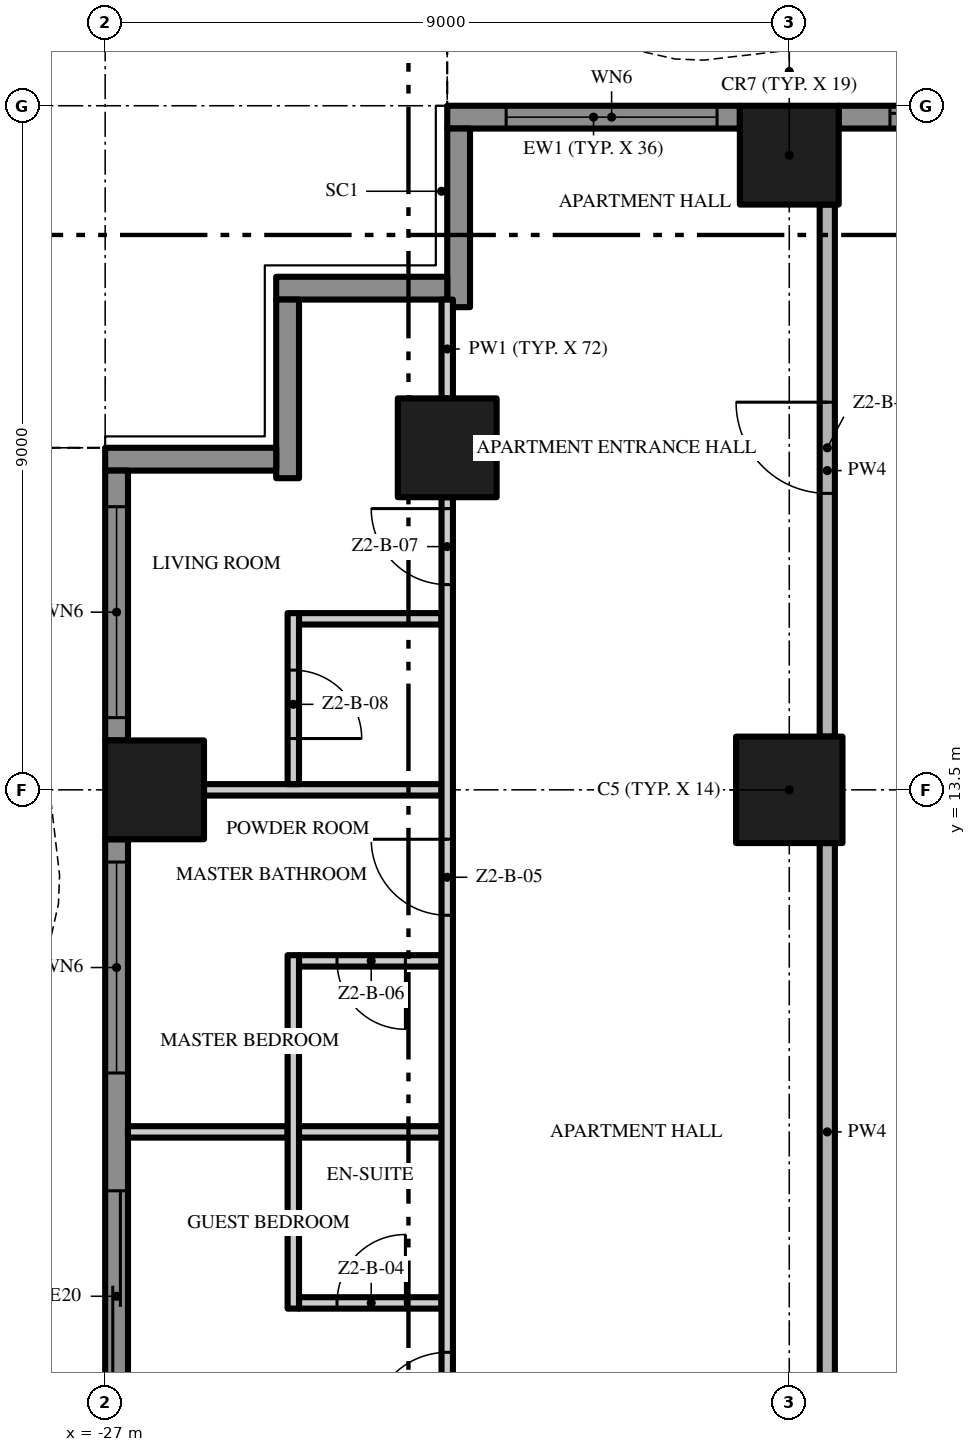
"""IFC4 building model, lengths in metres.
Left out: names, types, materials, properties, quantities, classifications, styles, units other than length and angle.
Written with IfcOpenShell. Run it as: python <this file> out.ifc"""

import sys

from ifc_helpers import new_model, si_unit, direction, frame, frame_2d, origin, origin_2d, place, context, subcontext, project, spatial, polyline, rectangle, outline, extrude, element, fill, save


model = new_model("IFC4")
c1 = context("Model", 3, precision=1e-05, world=origin(), true_north=direction((0.0, 1.0)))
c2 = subcontext(c1, "Body", "Model", "MODEL_VIEW")
j1 = project(units=[si_unit("LENGTHUNIT", "METRE"), si_unit("PLANEANGLEUNIT", "RADIAN")], contexts=[c1])
p1 = place(None, origin())
s1 = spatial("IfcSite", under=j1, at=p1, CompositionType="ELEMENT")
p2 = place(p1, origin())
s2 = spatial("IfcBuilding", under=s1, at=p2, CompositionType="ELEMENT")
p3 = place(p2, frame((0.0, 0.0, 88.4)))
s3 = spatial("IfcBuildingStorey", under=s2, at=p3, CompositionType="ELEMENT", Elevation=88.4)
p4 = place(p3, frame((-18.0, 13.5, 0.0), z_axis=(0.0, 0.0, 1.0), x_axis=(1.0, 0.0, 0.0)))
e1 = element("IfcColumn", 1, at=p4, inside=s3, PredefinedType="COLUMN", context=c2, shape_type="SweptSolid", body=[
    extrude(rectangle(XDim=1.4, YDim=1.4, at=origin_2d()), origin(), (0.0, 0.0, 1.0), 3.5),
])
for number, where, z_axis, x_axis in (
    (2, (-18.0, 21.85, 0.0), (0.0, 0.0, 1.0), (1.0, 0.0, 0.0)),
    (3, (-26.35, 13.5, 0.0), (0.0, 0.0, 1.0), (1.0, 0.0, 0.0)),
    (4, (-22.5, 18.0, 0.0), (0.0, 0.0, 1.0), (1.0, 0.0, 0.0)),
):
    element("IfcColumn", number, at=place(p3, frame(where, z_axis=z_axis, x_axis=x_axis)), inside=s3, PredefinedType="COLUMN", context=c2, shape_type="SweptSolid", body=[
        extrude(rectangle(XDim=1.3, YDim=1.3, at=origin_2d()), origin(), (0.0, 0.0, 1.0), 3.5),
    ])
p5 = place(p3, frame((-17.35, 22.35, 0.0), z_axis=(0.0, 0.0, 1.0), x_axis=(1.0, 0.0, 0.0)))
e5 = element("IfcWall", 5, at=p5, inside=s3, PredefinedType="SOLIDWALL", context=c2, shape_type="SweptSolid", body=[
    extrude(rectangle(XDim=3.85, YDim=0.3, at=frame_2d((1.925, 0.0))), origin(), (0.0, 0.0, 1.0), 3.5),
])
p6 = place(p5, frame((0.675, 0.0, 0.0)))
e6 = element("IfcOpeningElement", 6, at=p6, cuts=e5, PredefinedType="OPENING", context=c2, shape_type="SweptSolid", body=[
    extrude(rectangle(XDim=2.4, YDim=2.4, at=frame_2d((1.2, 1.2))), frame((0.0, 0.16, 0.0), z_axis=(0.0, -1.0, 0.0), x_axis=(1.0, 0.0, 0.0)), (0.0, 0.0, 1.0), 0.32),
])
p7 = place(p3, frame((-22.5, 22.35, 0.0), z_axis=(0.0, 0.0, 1.0), x_axis=(1.0, 0.0, 0.0)))
e7 = element("IfcWall", 7, at=p7, inside=s3, PredefinedType="SOLIDWALL", context=c2, shape_type="SweptSolid", body=[
    extrude(rectangle(XDim=3.85, YDim=0.3, at=frame_2d((1.925, 0.0))), origin(), (0.0, 0.0, 1.0), 3.5),
])
p8 = place(p7, frame((0.775, 0.0, 0.45)))
e8 = element("IfcOpeningElement", 8, at=p8, cuts=e7, PredefinedType="OPENING", context=c2, shape_type="SweptSolid", body=[
    extrude(rectangle(XDim=2.775, YDim=2.65, at=frame_2d((1.387, 1.325))), frame((0.0, 0.16, 0.0), z_axis=(0.0, -1.0, 0.0), x_axis=(1.0, 0.0, 0.0)), (0.0, 0.0, 1.0), 0.32),
])
p9 = place(p3, frame((-22.35, 19.85, 0.0), z_axis=(0.0, 0.0, 1.0), x_axis=(0.0, 1.0, 0.0)))
e9 = element("IfcWall", 9, at=p9, inside=s3, PredefinedType="SOLIDWALL", context=c2, shape_type="SweptSolid", body=[
    extrude(rectangle(XDim=2.35, YDim=0.3, at=frame_2d((1.175, 0.0))), origin(), (0.0, 0.0, 1.0), 3.5),
])
p10 = place(p3, frame((-24.75, 20.1, 0.0), z_axis=(0.0, 0.0, 1.0), x_axis=(1.0, 0.0, 0.0)))
e10 = element("IfcWall", 10, at=p10, inside=s3, PredefinedType="SOLIDWALL", context=c2, shape_type="SweptSolid", body=[
    extrude(rectangle(XDim=2.25, YDim=0.3, at=frame_2d((1.125, 0.0))), origin(), (0.0, 0.0, 1.0), 3.5),
])
p11 = place(p3, frame((-24.6, 17.6, 0.0), z_axis=(0.0, 0.0, 1.0), x_axis=(0.0, 1.0, 0.0)))
e11 = element("IfcWall", 11, at=p11, inside=s3, PredefinedType="SOLIDWALL", context=c2, shape_type="SweptSolid", body=[
    extrude(rectangle(XDim=2.35, YDim=0.3, at=frame_2d((1.175, 0.0))), origin(), (0.0, 0.0, 1.0), 3.5),
])
p12 = place(p3, frame((-27.0, 17.85, 0.0), z_axis=(0.0, 0.0, 1.0), x_axis=(1.0, 0.0, 0.0)))
e12 = element("IfcWall", 12, at=p12, inside=s3, PredefinedType="SOLIDWALL", context=c2, shape_type="SweptSolid", body=[
    extrude(rectangle(XDim=2.25, YDim=0.3, at=frame_2d((1.125, 0.0))), origin(), (0.0, 0.0, 1.0), 3.5),
])
p13 = place(p3, frame((-26.85, 14.15, 0.0), z_axis=(0.0, 0.0, 1.0), x_axis=(0.0, 1.0, 0.0)))
e13 = element("IfcWall", 13, at=p13, inside=s3, PredefinedType="SOLIDWALL", context=c2, shape_type="SweptSolid", body=[
    extrude(rectangle(XDim=3.55, YDim=0.3, at=frame_2d((1.775, 0.0))), origin(), (0.0, 0.0, 1.0), 3.5),
])
p14 = place(p13, frame((0.3, 0.0, 0.45)))
e14 = element("IfcOpeningElement", 14, at=p14, cuts=e13, PredefinedType="OPENING", context=c2, shape_type="SweptSolid", body=[
    extrude(rectangle(XDim=2.775, YDim=2.65, at=frame_2d((1.387, 1.325))), frame((0.0, 0.16, 0.0), z_axis=(0.0, -1.0, 0.0), x_axis=(1.0, 0.0, 0.0)), (0.0, 0.0, 1.0), 0.32),
])
p15 = place(p3, frame((-26.85, 5.15, 0.0), z_axis=(0.0, 0.0, 1.0), x_axis=(0.0, 1.0, 0.0)))
e15 = element("IfcWall", 15, at=p15, inside=s3, PredefinedType="SOLIDWALL", context=c2, shape_type="SweptSolid", body=[
    extrude(rectangle(XDim=7.7, YDim=0.3, at=frame_2d((3.85, 0.0))), origin(), (0.0, 0.0, 1.0), 3.5),
])
p16 = place(p15, frame((4.625, 0.0, 0.45)))
e16 = element("IfcOpeningElement", 16, at=p16, cuts=e15, PredefinedType="OPENING", context=c2, shape_type="SweptSolid", body=[
    extrude(rectangle(XDim=2.775, YDim=2.65, at=frame_2d((1.387, 1.325))), frame((0.0, 0.16, 0.0), z_axis=(0.0, -1.0, 0.0), x_axis=(1.0, 0.0, 0.0)), (0.0, 0.0, 1.0), 0.32),
])
p17 = place(p15, frame((0.3, 0.0, 0.0)))
e17 = element("IfcOpeningElement", 17, at=p17, cuts=e15, PredefinedType="OPENING", context=c2, shape_type="SweptSolid", body=[
    extrude(rectangle(XDim=2.775, YDim=2.4, at=frame_2d((1.387, 1.2))), frame((0.0, 0.16, 0.0), z_axis=(0.0, -1.0, 0.0), x_axis=(1.0, 0.0, 0.0)), (0.0, 0.0, 1.0), 0.32),
])
p18 = place(p3, origin())
e18 = element("IfcWall", 18, at=p18, inside=s3, PredefinedType="USERDEFINED", context=c2, shape_type="SweptSolid", body=[
    extrude(outline(polyline([(-13.5, 25.149), (-15.0, 24.488), (-16.5, 23.755), (-18.0, 23.231), (-19.125, 23.1), (-19.5, 23.115), (-21.0, 23.451), (-22.5, 24.112), (-22.601, 23.883), (-21.079, 23.213), (-19.533, 22.866), (-19.115, 22.849), (-17.944, 22.986), (-16.404, 23.524), (-14.895, 24.261), (-13.399, 24.92), (-13.5, 25.149)])), origin(), (0.0, 0.0, 1.0), 0.9),
])
p19 = place(p3, origin())
e19 = element("IfcWall", 19, at=p19, inside=s3, PredefinedType="USERDEFINED", context=c2, shape_type="SweptSolid", body=[
    extrude(outline(polyline([(-29.649, 18.0), (-28.988, 16.5), (-28.255, 15.0), (-27.731, 13.5), (-27.6, 12.375), (-27.615, 12.0), (-27.951, 10.5), (-28.612, 9.0), (-29.345, 7.5), (-29.869, 6.0), (-30.0, 4.875), (-29.985, 4.5), (-29.649, 3.0), (-28.988, 1.5), (-28.255, 0.0), (-27.731, -1.5), (-27.6, -2.625), (-27.615, -3.0), (-27.951, -4.5), (-28.612, -6.0), (-29.345, -7.5), (-29.869, -9.0), (-30.0, -10.125), (-29.985, -10.5), (-29.649, -12.0), (-28.988, -13.5), (-28.255, -15.0), (-27.731, -16.5), (-27.6, -17.625), (-27.615, -18.0), (-27.365, -18.01), (-27.349, -17.615), (-27.486, -16.444), (-28.024, -14.904), (-28.761, -13.395), (-29.41, -11.921), (-29.736, -10.467), (-29.749, -10.135), (-29.624, -9.056), (-29.114, -7.596), (-28.385, -6.105), (-27.713, -4.579), (-27.366, -3.033), (-27.349, -2.615), (-27.486, -1.444), (-28.024, 0.096), (-28.761, 1.605), (-29.41, 3.079), (-29.736, 4.533), (-29.749, 4.865), (-29.624, 5.944), (-29.114, 7.404), (-28.385, 8.895), (-27.713, 10.421), (-27.366, 11.967), (-27.349, 12.385), (-27.486, 13.556), (-28.024, 15.096), (-28.761, 16.605), (-29.42, 18.101), (-29.649, 18.0)])), origin(), (0.0, 0.0, 1.0), 0.9),
])
p20 = place(p3, frame((-24.45, 6.75, 0.0), z_axis=(0.0, 0.0, 1.0), x_axis=(1.0, 0.0, 0.0)))
e20 = element("IfcWall", 20, at=p20, inside=s3, PredefinedType="PARTITIONING", context=c2, shape_type="SweptSolid", body=[
    extrude(rectangle(XDim=1.875, YDim=0.15, at=frame_2d((0.938, 0.0))), origin(), (0.0, 0.0, 1.0), 3.5),
])
p21 = place(p20, frame((0.5, 0.0, 0.0)))
e21 = element("IfcOpeningElement", 21, at=p21, cuts=e20, PredefinedType="OPENING", context=c2, shape_type="SweptSolid", body=[
    extrude(rectangle(XDim=0.9, YDim=2.1, at=frame_2d((0.45, 1.05))), frame((0.0, 0.085, 0.0), z_axis=(0.0, -1.0, 0.0), x_axis=(1.0, 0.0, 0.0)), (0.0, 0.0, 1.0), 0.17),
])
p22 = place(p3, frame((-26.7, 9.0, 0.0), z_axis=(0.0, 0.0, 1.0), x_axis=(1.0, 0.0, 0.0)))
e22 = element("IfcWall", 22, at=p22, inside=s3, PredefinedType="PARTITIONING", context=c2, shape_type="SweptSolid", body=[
    extrude(rectangle(XDim=2.1, YDim=0.15, at=frame_2d((1.05, 0.0))), origin(), (0.0, 0.0, 1.0), 3.5),
])
p23 = place(p3, frame((-24.45, 9.0, 0.0), z_axis=(0.0, 0.0, 1.0), x_axis=(1.0, 0.0, 0.0)))
e23 = element("IfcWall", 23, at=p23, inside=s3, PredefinedType="PARTITIONING", context=c2, shape_type="SweptSolid", body=[
    extrude(rectangle(XDim=1.875, YDim=0.15, at=frame_2d((0.938, 0.0))), origin(), (0.0, 0.0, 1.0), 3.5),
])
p24 = place(p3, frame((-22.575, 11.25, 0.0), z_axis=(0.0, 0.0, 1.0), x_axis=(-1.0, 0.0, 0.0)))
e24 = element("IfcWall", 24, at=p24, inside=s3, PredefinedType="PARTITIONING", context=c2, shape_type="SweptSolid", body=[
    extrude(rectangle(XDim=1.875, YDim=0.15, at=frame_2d((0.938, 0.0))), origin(), (0.0, 0.0, 1.0), 3.5),
])
p25 = place(p24, frame((0.475, 0.0, 0.0)))
e25 = element("IfcOpeningElement", 25, at=p25, cuts=e24, PredefinedType="OPENING", context=c2, shape_type="SweptSolid", body=[
    extrude(rectangle(XDim=0.9, YDim=2.1, at=frame_2d((0.45, 1.05))), frame((0.0, 0.085, 0.0), z_axis=(0.0, -1.0, 0.0), x_axis=(1.0, 0.0, 0.0)), (0.0, 0.0, 1.0), 0.17),
])
p26 = place(p3, frame((-25.7, 13.5, 0.0), z_axis=(0.0, 0.0, 1.0), x_axis=(1.0, 0.0, 0.0)))
e26 = element("IfcWall", 26, at=p26, inside=s3, PredefinedType="PARTITIONING", context=c2, shape_type="SweptSolid", body=[
    extrude(rectangle(XDim=3.125, YDim=0.15, at=frame_2d((1.562, 0.0))), origin(), (0.0, 0.0, 1.0), 3.5),
])
p27 = place(p3, frame((-24.45, 15.75, 0.0), z_axis=(0.0, 0.0, 1.0), x_axis=(1.0, 0.0, 0.0)))
e27 = element("IfcWall", 27, at=p27, inside=s3, PredefinedType="PARTITIONING", context=c2, shape_type="SweptSolid", body=[
    extrude(rectangle(XDim=1.875, YDim=0.15, at=frame_2d((0.938, 0.0))), origin(), (0.0, 0.0, 1.0), 3.5),
])
p28 = place(p3, frame((-24.525, 6.675, 0.0), z_axis=(0.0, 0.0, 1.0), x_axis=(0.0, 1.0, 0.0)))
e28 = element("IfcWall", 28, at=p28, inside=s3, PredefinedType="PARTITIONING", context=c2, shape_type="SweptSolid", body=[
    extrude(rectangle(XDim=4.65, YDim=0.15, at=frame_2d((2.325, 0.0))), origin(), (0.0, 0.0, 1.0), 3.5),
])
p29 = place(p3, frame((-24.525, 15.825, 0.0), z_axis=(0.0, 0.0, 1.0), x_axis=(0.0, -1.0, 0.0)))
e29 = element("IfcWall", 29, at=p29, inside=s3, PredefinedType="PARTITIONING", context=c2, shape_type="SweptSolid", body=[
    extrude(rectangle(XDim=2.25, YDim=0.15, at=frame_2d((1.125, 0.0))), origin(), (0.0, 0.0, 1.0), 3.5),
])
p30 = place(p29, frame((0.75, 0.0, 0.0)))
e30 = element("IfcOpeningElement", 30, at=p30, cuts=e29, PredefinedType="OPENING", context=c2, shape_type="SweptSolid", body=[
    extrude(rectangle(XDim=0.9, YDim=2.1, at=frame_2d((0.45, 1.05))), frame((0.0, 0.085, 0.0), z_axis=(0.0, -1.0, 0.0), x_axis=(1.0, 0.0, 0.0)), (0.0, 0.0, 1.0), 0.17),
])
p31 = place(p3, frame((-22.5, 0.1, 0.0), z_axis=(0.0, 0.0, 1.0), x_axis=(0.0, 1.0, 0.0)))
e31 = element("IfcWall", 31, at=p31, inside=s3, PredefinedType="PARTITIONING", context=c2, shape_type="SweptSolid", body=[
    extrude(rectangle(XDim=17.25, YDim=0.15, at=frame_2d((8.625, 0.0))), origin(), (0.0, 0.0, 1.0), 3.5),
])
p32 = place(p31, frame((1.65, 0.0, 0.0)))
e32 = element("IfcOpeningElement", 32, at=p32, cuts=e31, PredefinedType="OPENING", context=c2, shape_type="SweptSolid", body=[
    extrude(rectangle(XDim=1.0, YDim=2.4, at=frame_2d((0.5, 1.2))), frame((0.0, 0.085, 0.0), z_axis=(0.0, -1.0, 0.0), x_axis=(1.0, 0.0, 0.0)), (0.0, 0.0, 1.0), 0.17),
])
p33 = place(p31, frame((5.0, 0.0, 0.0)))
e33 = element("IfcOpeningElement", 33, at=p33, cuts=e31, PredefinedType="OPENING", context=c2, shape_type="SweptSolid", body=[
    extrude(rectangle(XDim=1.0, YDim=2.4, at=frame_2d((0.5, 1.2))), frame((0.0, 0.085, 0.0), z_axis=(0.0, -1.0, 0.0), x_axis=(1.0, 0.0, 0.0)), (0.0, 0.0, 1.0), 0.17),
])
p34 = place(p31, frame((11.75, 0.0, 0.0)))
e34 = element("IfcOpeningElement", 34, at=p34, cuts=e31, PredefinedType="OPENING", context=c2, shape_type="SweptSolid", body=[
    extrude(rectangle(XDim=1.0, YDim=2.4, at=frame_2d((0.5, 1.2))), frame((0.0, 0.085, 0.0), z_axis=(0.0, -1.0, 0.0), x_axis=(1.0, 0.0, 0.0)), (0.0, 0.0, 1.0), 0.17),
])
p35 = place(p31, frame((16.1, 0.0, 0.0)))
e35 = element("IfcOpeningElement", 35, at=p35, cuts=e31, PredefinedType="OPENING", context=c2, shape_type="SweptSolid", body=[
    extrude(rectangle(XDim=1.0, YDim=2.4, at=frame_2d((0.5, 1.2))), frame((0.0, 0.085, 0.0), z_axis=(0.0, -1.0, 0.0), x_axis=(1.0, 0.0, 0.0)), (0.0, 0.0, 1.0), 0.17),
])
p36 = place(p3, frame((-22.5, 18.65, 0.0), z_axis=(0.0, 0.0, 1.0), x_axis=(0.0, 1.0, 0.0)))
e36 = element("IfcWall", 36, at=p36, inside=s3, PredefinedType="PARTITIONING", context=c2, shape_type="SweptSolid", body=[
    extrude(rectangle(XDim=1.3, YDim=0.15, at=frame_2d((0.65, 0.0))), origin(), (0.0, 0.0, 1.0), 3.5),
])
p37 = place(p3, frame((-17.5, 5.2, 0.0), z_axis=(0.0, 0.0, 1.0), x_axis=(0.0, 1.0, 0.0)))
e37 = element("IfcWall", 37, at=p37, inside=s3, PredefinedType="PARTITIONING", context=c2, shape_type="SweptSolid", body=[
    extrude(rectangle(XDim=7.6, YDim=0.2, at=frame_2d((3.8, 0.0))), origin(), (0.0, 0.0, 1.0), 3.5),
])
p38 = place(p3, frame((-17.5, 14.2, 0.0), z_axis=(0.0, 0.0, 1.0), x_axis=(0.0, 1.0, 0.0)))
e38 = element("IfcWall", 38, at=p38, inside=s3, PredefinedType="PARTITIONING", context=c2, shape_type="SweptSolid", body=[
    extrude(rectangle(XDim=7.0, YDim=0.2, at=frame_2d((3.5, 0.0))), origin(), (0.0, 0.0, 1.0), 3.5),
])
p39 = place(p38, frame((3.2, 0.0, 0.0)))
e39 = element("IfcOpeningElement", 39, at=p39, cuts=e38, PredefinedType="OPENING", context=c2, shape_type="SweptSolid", body=[
    extrude(rectangle(XDim=1.2, YDim=2.4, at=frame_2d((0.6, 1.2))), frame((0.0, 0.11, 0.0), z_axis=(0.0, -1.0, 0.0), x_axis=(1.0, 0.0, 0.0)), (0.0, 0.0, 1.0), 0.22),
])
p40 = place(p6, origin())
e40 = element("IfcDoor", 40, at=p40, inside=s3, OperationType="SINGLE_SWING_LEFT", PredefinedType="DOOR", context=c2, shape_type="SweptSolid", body=[
    extrude(rectangle(XDim=2.4, YDim=2.4, at=frame_2d((1.2, 1.2))), frame((0.0, 0.025, 0.0), z_axis=(0.0, -1.0, 0.0), x_axis=(1.0, 0.0, 0.0)), (0.0, 0.0, 1.0), 0.05),
])
fill(e6, e40)
p41 = place(p8, origin())
e41 = element("IfcWindow", 41, at=p41, inside=s3, PartitioningType="SINGLE_PANEL", PredefinedType="WINDOW", context=c2, shape_type="SweptSolid", body=[
    extrude(rectangle(XDim=2.775, YDim=2.65, at=frame_2d((1.387, 1.325))), frame((0.0, 0.03, 0.0), z_axis=(0.0, -1.0, 0.0), x_axis=(1.0, 0.0, 0.0)), (0.0, 0.0, 1.0), 0.06),
])
fill(e8, e41)
p42 = place(p14, origin())
e42 = element("IfcWindow", 42, at=p42, inside=s3, PartitioningType="SINGLE_PANEL", PredefinedType="WINDOW", context=c2, shape_type="SweptSolid", body=[
    extrude(rectangle(XDim=2.775, YDim=2.65, at=frame_2d((1.387, 1.325))), frame((0.0, 0.03, 0.0), z_axis=(0.0, -1.0, 0.0), x_axis=(1.0, 0.0, 0.0)), (0.0, 0.0, 1.0), 0.06),
])
fill(e14, e42)
p43 = place(p16, origin())
e43 = element("IfcWindow", 43, at=p43, inside=s3, PartitioningType="SINGLE_PANEL", PredefinedType="WINDOW", context=c2, shape_type="SweptSolid", body=[
    extrude(rectangle(XDim=2.775, YDim=2.65, at=frame_2d((1.387, 1.325))), frame((0.0, 0.03, 0.0), z_axis=(0.0, -1.0, 0.0), x_axis=(1.0, 0.0, 0.0)), (0.0, 0.0, 1.0), 0.06),
])
fill(e16, e43)
p44 = place(p17, origin())
e44 = element("IfcDoor", 44, at=p44, inside=s3, OperationType="SINGLE_SWING_LEFT", PredefinedType="DOOR", context=c2, shape_type="SweptSolid", body=[
    extrude(rectangle(XDim=2.775, YDim=2.4, at=frame_2d((1.387, 1.2))), frame((0.0, 0.025, 0.0), z_axis=(0.0, -1.0, 0.0), x_axis=(1.0, 0.0, 0.0)), (0.0, 0.0, 1.0), 0.05),
])
fill(e17, e44)
p45 = place(p39, origin())
e45 = element("IfcDoor", 45, at=p45, inside=s3, OperationType="SINGLE_SWING_RIGHT", PredefinedType="DOOR", context=c2, shape_type="SweptSolid", body=[
    extrude(rectangle(XDim=1.2, YDim=2.4, at=frame_2d((0.6, 1.2))), frame((0.0, 0.025, 0.0), z_axis=(0.0, -1.0, 0.0), x_axis=(1.0, 0.0, 0.0)), (0.0, 0.0, 1.0), 0.05),
])
fill(e39, e45)
p46 = place(p33, origin())
e46 = element("IfcDoor", 46, at=p46, inside=s3, OperationType="SINGLE_SWING_LEFT", PredefinedType="DOOR", context=c2, shape_type="SweptSolid", body=[
    extrude(rectangle(XDim=1.0, YDim=2.4, at=frame_2d((0.5, 1.2))), frame((0.0, 0.025, 0.0), z_axis=(0.0, -1.0, 0.0), x_axis=(1.0, 0.0, 0.0)), (0.0, 0.0, 1.0), 0.05),
])
fill(e33, e46)
p47 = place(p21, origin())
e47 = element("IfcDoor", 47, at=p47, inside=s3, OperationType="SINGLE_SWING_RIGHT", PredefinedType="DOOR", context=c2, shape_type="SweptSolid", body=[
    extrude(rectangle(XDim=0.9, YDim=2.1, at=frame_2d((0.45, 1.05))), frame((0.0, 0.025, 0.0), z_axis=(0.0, -1.0, 0.0), x_axis=(1.0, 0.0, 0.0)), (0.0, 0.0, 1.0), 0.05),
])
fill(e21, e47)
p48 = place(p34, origin())
e48 = element("IfcDoor", 48, at=p48, inside=s3, OperationType="SINGLE_SWING_RIGHT", PredefinedType="DOOR", context=c2, shape_type="SweptSolid", body=[
    extrude(rectangle(XDim=1.0, YDim=2.4, at=frame_2d((0.5, 1.2))), frame((0.0, 0.025, 0.0), z_axis=(0.0, -1.0, 0.0), x_axis=(1.0, 0.0, 0.0)), (0.0, 0.0, 1.0), 0.05),
])
fill(e34, e48)
p49 = place(p25, origin())
e49 = element("IfcDoor", 49, at=p49, inside=s3, OperationType="SINGLE_SWING_LEFT", PredefinedType="DOOR", context=c2, shape_type="SweptSolid", body=[
    extrude(rectangle(XDim=0.9, YDim=2.1, at=frame_2d((0.45, 1.05))), frame((0.0, 0.025, 0.0), z_axis=(0.0, -1.0, 0.0), x_axis=(1.0, 0.0, 0.0)), (0.0, 0.0, 1.0), 0.05),
])
fill(e25, e49)
p50 = place(p35, origin())
e50 = element("IfcDoor", 50, at=p50, inside=s3, OperationType="SINGLE_SWING_RIGHT", PredefinedType="DOOR", context=c2, shape_type="SweptSolid", body=[
    extrude(rectangle(XDim=1.0, YDim=2.4, at=frame_2d((0.5, 1.2))), frame((0.0, 0.025, 0.0), z_axis=(0.0, -1.0, 0.0), x_axis=(1.0, 0.0, 0.0)), (0.0, 0.0, 1.0), 0.05),
])
fill(e35, e50)
p51 = place(p30, origin())
e51 = element("IfcDoor", 51, at=p51, inside=s3, OperationType="SINGLE_SWING_RIGHT", PredefinedType="DOOR", context=c2, shape_type="SweptSolid", body=[
    extrude(rectangle(XDim=0.9, YDim=2.1, at=frame_2d((0.45, 1.05))), frame((0.0, 0.025, 0.0), z_axis=(0.0, -1.0, 0.0), x_axis=(1.0, 0.0, 0.0)), (0.0, 0.0, 1.0), 0.05),
])
fill(e30, e51)
save(model, sys.argv[1])
